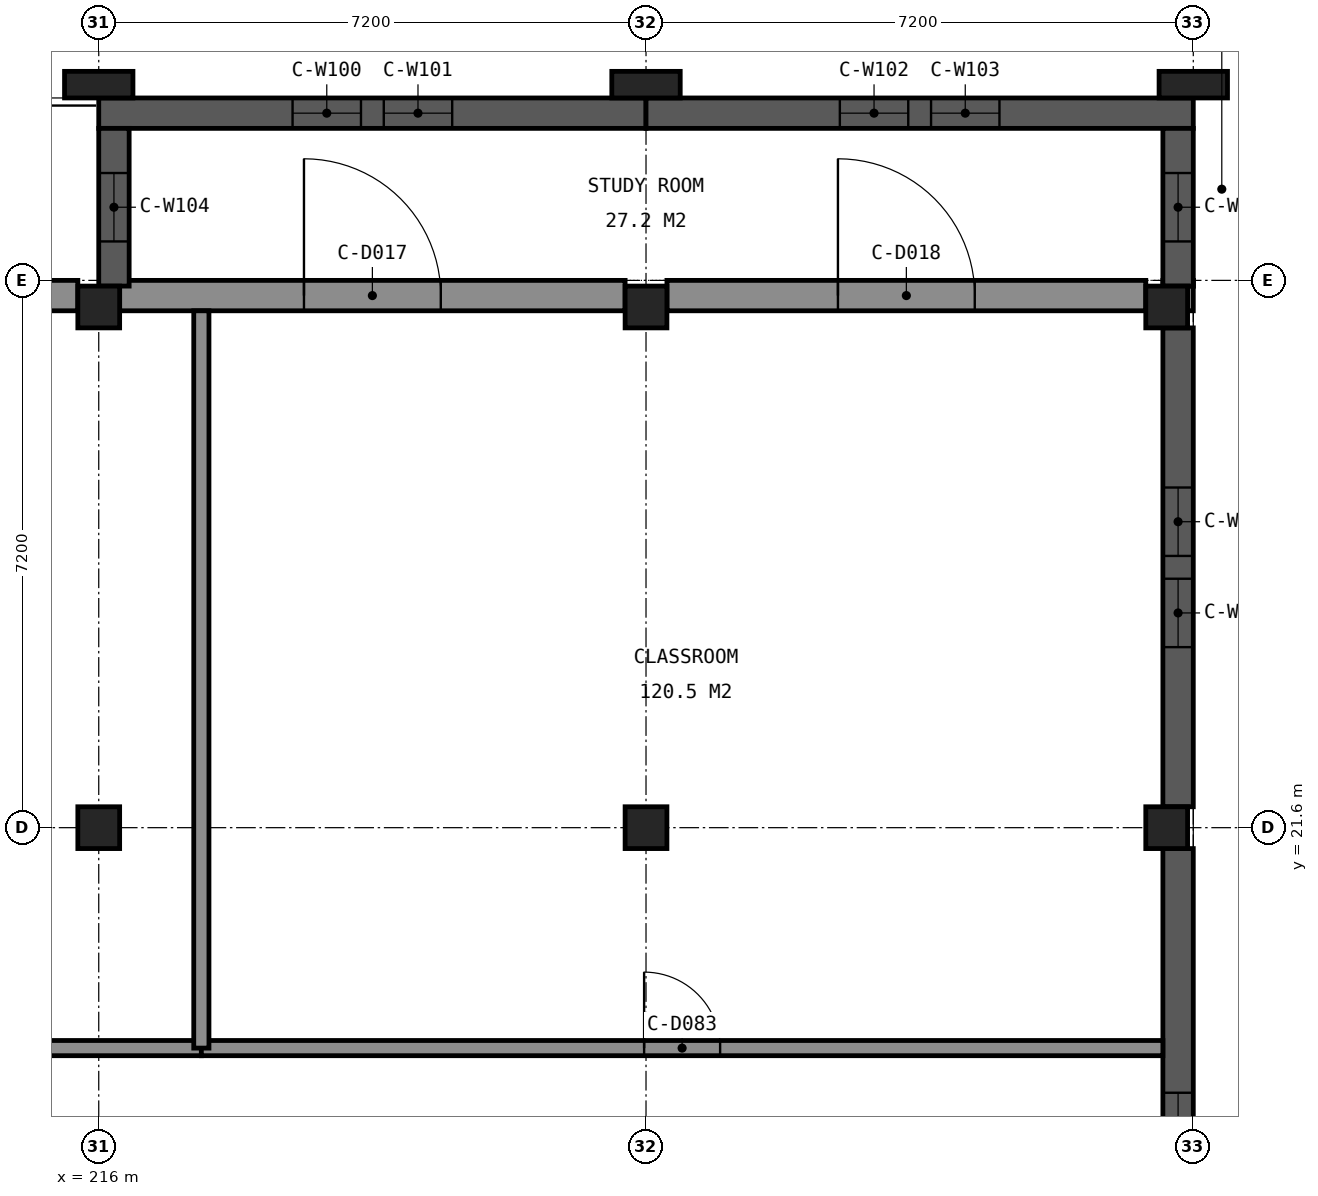
"""IFC4 building model, lengths in metres.
Left out: names, types, materials, properties, quantities, classifications, styles, units other than length and angle.
Written with IfcOpenShell. Run it as: python <this file> out.ifc"""

import sys

from ifc_helpers import new_model, si_unit, direction, frame, frame_2d, origin, origin_2d, place, context, subcontext, project, spatial, rectangle, extrude, element, fill, save


model = new_model("IFC4")
c1 = context("Model", 3, precision=1e-05, world=origin(), true_north=direction((0.0, 1.0)))
c2 = subcontext(c1, "Body", "Model", "MODEL_VIEW")
j1 = project(units=[si_unit("LENGTHUNIT", "METRE"), si_unit("PLANEANGLEUNIT", "RADIAN")], contexts=[c1])
p1 = place(None, origin())
s1 = spatial("IfcSite", under=j1, at=p1, CompositionType="ELEMENT")
p2 = place(p1, origin())
s2 = spatial("IfcBuilding", under=s1, at=p2, CompositionType="ELEMENT")
p3 = place(p2, frame((0.0, 0.0, 14.4)))
s3 = spatial("IfcBuildingStorey", under=s2, at=p3, CompositionType="ELEMENT", Elevation=14.4)
for number, where, z_axis, x_axis in (
    (1, (216.0, 28.45, 0.0), (0.0, 0.0, 1.0), (1.0, 0.0, 0.0)),
    (2, (223.2, 28.45, 0.0), (0.0, 0.0, 1.0), (1.0, 0.0, 0.0)),
    (3, (230.05, 28.45, 0.0), (0.0, 0.0, 1.0), (1.0, 0.0, 0.0)),
    (4, (216.0, 21.6, 0.0), (0.0, 0.0, 1.0), (1.0, 0.0, 0.0)),
    (5, (223.2, 21.6, 0.0), (0.0, 0.0, 1.0), (1.0, 0.0, 0.0)),
    (6, (230.05, 21.6, 0.0), (0.0, 0.0, 1.0), (1.0, 0.0, 0.0)),
):
    element("IfcColumn", number, at=place(p3, frame(where, z_axis=z_axis, x_axis=x_axis)), inside=s3, PredefinedType="COLUMN", context=c2, shape_type="SweptSolid", body=[
        extrude(rectangle(XDim=0.55, YDim=0.55, at=origin_2d()), origin(), (0.0, 0.0, 1.0), 4.8),
    ])
p4 = place(p3, frame((209.075, 28.6, 0.0), z_axis=(0.0, 0.0, 1.0), x_axis=(1.0, 0.0, 0.0)))
e7 = element("IfcWall", 7, at=p4, inside=s3, PredefinedType="SOLIDWALL", context=c2, shape_type="SweptSolid", body=[
    extrude(rectangle(XDim=6.65, YDim=0.4, at=frame_2d((3.325, 0.0))), origin(), (0.0, 0.0, 1.0), 3.7),
])
p5 = place(p4, frame((2.425, 0.0, 0.0)))
e8 = element("IfcOpeningElement", 8, at=p5, cuts=e7, PredefinedType="OPENING", context=c2, shape_type="SweptSolid", body=[
    extrude(rectangle(XDim=1.8, YDim=2.1, at=frame_2d((0.9, 1.05))), frame((0.0, 0.21, 0.0), z_axis=(0.0, -1.0, 0.0), x_axis=(1.0, 0.0, 0.0)), (0.0, 0.0, 1.0), 0.42),
])
p6 = place(p3, frame((216.275, 28.6, 0.0), z_axis=(0.0, 0.0, 1.0), x_axis=(1.0, 0.0, 0.0)))
e9 = element("IfcWall", 9, at=p6, inside=s3, PredefinedType="SOLIDWALL", context=c2, shape_type="SweptSolid", body=[
    extrude(rectangle(XDim=6.65, YDim=0.4, at=frame_2d((3.325, 0.0))), origin(), (0.0, 0.0, 1.0), 3.7),
])
p7 = place(p6, frame((2.425, 0.0, 0.0)))
e10 = element("IfcOpeningElement", 10, at=p7, cuts=e9, PredefinedType="OPENING", context=c2, shape_type="SweptSolid", body=[
    extrude(rectangle(XDim=1.8, YDim=2.1, at=frame_2d((0.9, 1.05))), frame((0.0, 0.21, 0.0), z_axis=(0.0, -1.0, 0.0), x_axis=(1.0, 0.0, 0.0)), (0.0, 0.0, 1.0), 0.42),
])
p8 = place(p3, frame((223.475, 28.6, 0.0), z_axis=(0.0, 0.0, 1.0), x_axis=(1.0, 0.0, 0.0)))
e11 = element("IfcWall", 11, at=p8, inside=s3, PredefinedType="SOLIDWALL", context=c2, shape_type="SweptSolid", body=[
    extrude(rectangle(XDim=6.3, YDim=0.4, at=frame_2d((3.15, 0.0))), origin(), (0.0, 0.0, 1.0), 3.7),
])
p9 = place(p8, frame((2.25, 0.0, 0.0)))
e12 = element("IfcOpeningElement", 12, at=p9, cuts=e11, PredefinedType="OPENING", context=c2, shape_type="SweptSolid", body=[
    extrude(rectangle(XDim=1.8, YDim=2.1, at=frame_2d((0.9, 1.05))), frame((0.0, 0.21, 0.0), z_axis=(0.0, -1.0, 0.0), x_axis=(1.0, 0.0, 0.0)), (0.0, 0.0, 1.0), 0.42),
])
p10 = place(p3, frame((230.325, 28.6, 0.0), z_axis=(0.0, 0.0, 1.0), x_axis=(1.0, 0.0, 0.0)))
e13 = element("IfcWall", 13, at=p10, inside=s3, PredefinedType="SOLIDWALL", context=c2, shape_type="SweptSolid", body=[
    extrude(rectangle(XDim=0.075, YDim=0.4, at=frame_2d((0.038, 0.0))), origin(), (0.0, 0.0, 1.0), 3.7),
])
p11 = place(p3, frame((230.2, 28.8, 0.0), z_axis=(0.0, 0.0, 1.0), x_axis=(0.0, -1.0, 0.0)))
e14 = element("IfcWall", 14, at=p11, inside=s3, PredefinedType="SHEAR", context=c2, shape_type="SweptSolid", body=[
    extrude(rectangle(XDim=0.075, YDim=0.4, at=frame_2d((0.038, 0.0))), origin(), (0.0, 0.0, 1.0), 3.7),
])
p12 = place(p3, frame((230.2, 28.175, 0.0), z_axis=(0.0, 0.0, 1.0), x_axis=(0.0, -1.0, 0.0)))
e15 = element("IfcWall", 15, at=p12, inside=s3, PredefinedType="SHEAR", context=c2, shape_type="SweptSolid", body=[
    extrude(rectangle(XDim=6.3, YDim=0.4, at=frame_2d((3.15, 0.0))), origin(), (0.0, 0.0, 1.0), 3.7),
])
p13 = place(p12, frame((2.1, 0.0, 1.8)))
e16 = element("IfcOpeningElement", 16, at=p13, cuts=e15, PredefinedType="OPENING", context=c2, shape_type="SweptSolid", body=[
    extrude(rectangle(XDim=0.9, YDim=1.2, at=frame_2d((0.45, 0.6))), frame((0.0, 0.21, 0.0), z_axis=(0.0, -1.0, 0.0), x_axis=(1.0, 0.0, 0.0)), (0.0, 0.0, 1.0), 0.42),
])
p14 = place(p12, frame((3.3, 0.0, 1.8)))
e17 = element("IfcOpeningElement", 17, at=p14, cuts=e15, PredefinedType="OPENING", context=c2, shape_type="SweptSolid", body=[
    extrude(rectangle(XDim=0.9, YDim=1.2, at=frame_2d((0.45, 0.6))), frame((0.0, 0.21, 0.0), z_axis=(0.0, -1.0, 0.0), x_axis=(1.0, 0.0, 0.0)), (0.0, 0.0, 1.0), 0.42),
])
p15 = place(p3, frame((230.2, 21.325, 0.0), z_axis=(0.0, 0.0, 1.0), x_axis=(0.0, -1.0, 0.0)))
e18 = element("IfcWall", 18, at=p15, inside=s3, PredefinedType="SHEAR", context=c2, shape_type="SweptSolid", body=[
    extrude(rectangle(XDim=6.125, YDim=0.4, at=frame_2d((3.062, 0.0))), origin(), (0.0, 0.0, 1.0), 3.7),
])
p16 = place(p15, frame((3.212, 0.0, 1.8)))
e19 = element("IfcOpeningElement", 19, at=p16, cuts=e18, PredefinedType="OPENING", context=c2, shape_type="SweptSolid", body=[
    extrude(rectangle(XDim=0.9, YDim=1.2, at=frame_2d((0.45, 0.6))), frame((0.0, 0.21, 0.0), z_axis=(0.0, -1.0, 0.0), x_axis=(1.0, 0.0, 0.0)), (0.0, 0.0, 1.0), 0.42),
])
p17 = place(p3, frame((158.4, 28.6, 4.8), z_axis=(0.0, 0.0, 1.0), x_axis=(1.0, 0.0, 0.0)))
e20 = element("IfcWall", 20, at=p17, inside=s3, PredefinedType="SOLIDWALL", context=c2, shape_type="SweptSolid", body=[
    extrude(rectangle(XDim=72.0, YDim=0.4, at=frame_2d((36.0, 0.0))), origin(), (0.0, 0.0, 1.0), 0.45),
])
p18 = place(p3, frame((230.2, 28.4, 4.8), z_axis=(0.0, 0.0, 1.0), x_axis=(0.0, -1.0, 0.0)))
e21 = element("IfcWall", 21, at=p18, inside=s3, PredefinedType="SOLIDWALL", context=c2, shape_type="SweptSolid", body=[
    extrude(rectangle(XDim=10.6, YDim=0.4, at=frame_2d((5.3, 0.0))), origin(), (0.0, 0.0, 1.0), 0.45),
])
for number, where, z_axis, x_axis in (
    (22, (216.0, 21.6, 4.8), (0.0, 0.0, 1.0), (1.0, 0.0, 0.0)),
    (23, (223.2, 21.6, 4.8), (0.0, 0.0, 1.0), (1.0, 0.0, 0.0)),
):
    element("IfcColumn", number, at=place(p3, frame(where, z_axis=z_axis, x_axis=x_axis)), inside=s3, PredefinedType="COLUMN", context=c2, shape_type="SweptSolid", body=[
        extrude(rectangle(XDim=0.3, YDim=0.3, at=origin_2d()), origin(), (0.0, 0.0, 1.0), 1.4),
    ])
p19 = place(p3, frame((216.0, 31.0, 0.0), z_axis=(0.0, 0.0, 1.0), x_axis=(1.0, 0.0, 0.0)))
e24 = element("IfcWall", 24, at=p19, inside=s3, PredefinedType="SOLIDWALL", context=c2, shape_type="SweptSolid", body=[
    extrude(rectangle(XDim=7.2, YDim=0.4, at=frame_2d((3.6, 0.0))), origin(), (0.0, 0.0, 1.0), 4.893),
])
p20 = place(p19, frame((2.55, 0.0, 1.8)))
e25 = element("IfcOpeningElement", 25, at=p20, cuts=e24, PredefinedType="OPENING", context=c2, shape_type="SweptSolid", body=[
    extrude(rectangle(XDim=0.9, YDim=1.2, at=frame_2d((0.45, 0.6))), frame((0.0, 0.21, 0.0), z_axis=(0.0, -1.0, 0.0), x_axis=(1.0, 0.0, 0.0)), (0.0, 0.0, 1.0), 0.42),
])
p21 = place(p19, frame((3.75, 0.0, 1.8)))
e26 = element("IfcOpeningElement", 26, at=p21, cuts=e24, PredefinedType="OPENING", context=c2, shape_type="SweptSolid", body=[
    extrude(rectangle(XDim=0.9, YDim=1.2, at=frame_2d((0.45, 0.6))), frame((0.0, 0.21, 0.0), z_axis=(0.0, -1.0, 0.0), x_axis=(1.0, 0.0, 0.0)), (0.0, 0.0, 1.0), 0.42),
])
p22 = place(p3, frame((223.2, 31.0, 0.0), z_axis=(0.0, 0.0, 1.0), x_axis=(1.0, 0.0, 0.0)))
e27 = element("IfcWall", 27, at=p22, inside=s3, PredefinedType="SOLIDWALL", context=c2, shape_type="SweptSolid", body=[
    extrude(rectangle(XDim=7.2, YDim=0.4, at=frame_2d((3.6, 0.0))), origin(), (0.0, 0.0, 1.0), 4.893),
])
p23 = place(p22, frame((2.55, 0.0, 1.8)))
e28 = element("IfcOpeningElement", 28, at=p23, cuts=e27, PredefinedType="OPENING", context=c2, shape_type="SweptSolid", body=[
    extrude(rectangle(XDim=0.9, YDim=1.2, at=frame_2d((0.45, 0.6))), frame((0.0, 0.21, 0.0), z_axis=(0.0, -1.0, 0.0), x_axis=(1.0, 0.0, 0.0)), (0.0, 0.0, 1.0), 0.42),
])
p24 = place(p22, frame((3.75, 0.0, 1.8)))
e29 = element("IfcOpeningElement", 29, at=p24, cuts=e27, PredefinedType="OPENING", context=c2, shape_type="SweptSolid", body=[
    extrude(rectangle(XDim=0.9, YDim=1.2, at=frame_2d((0.45, 0.6))), frame((0.0, 0.21, 0.0), z_axis=(0.0, -1.0, 0.0), x_axis=(1.0, 0.0, 0.0)), (0.0, 0.0, 1.0), 0.42),
])
p25 = place(p3, frame((216.2, 28.725, 0.0), z_axis=(0.0, 0.0, 1.0), x_axis=(0.0, 1.0, 0.0)))
e30 = element("IfcWall", 30, at=p25, inside=s3, PredefinedType="SOLIDWALL", context=c2, shape_type="SweptSolid", body=[
    extrude(rectangle(XDim=2.075, YDim=0.4, at=frame_2d((1.038, 0.0))), origin(), (0.0, 0.0, 1.0), 4.893),
])
p26 = place(p25, frame((0.587, 0.0, 1.8)))
e31 = element("IfcOpeningElement", 31, at=p26, cuts=e30, PredefinedType="OPENING", context=c2, shape_type="SweptSolid", body=[
    extrude(rectangle(XDim=0.9, YDim=1.2, at=frame_2d((0.45, 0.6))), frame((0.0, 0.21, 0.0), z_axis=(0.0, -1.0, 0.0), x_axis=(1.0, 0.0, 0.0)), (0.0, 0.0, 1.0), 0.42),
])
p27 = place(p3, frame((230.2, 30.8, 0.0), z_axis=(0.0, 0.0, 1.0), x_axis=(0.0, -1.0, 0.0)))
e32 = element("IfcWall", 32, at=p27, inside=s3, PredefinedType="SOLIDWALL", context=c2, shape_type="SweptSolid", body=[
    extrude(rectangle(XDim=2.075, YDim=0.4, at=frame_2d((1.038, 0.0))), origin(), (0.0, 0.0, 1.0), 4.893),
])
p28 = place(p27, frame((0.587, 0.0, 1.8)))
e33 = element("IfcOpeningElement", 33, at=p28, cuts=e32, PredefinedType="OPENING", context=c2, shape_type="SweptSolid", body=[
    extrude(rectangle(XDim=0.9, YDim=1.2, at=frame_2d((0.45, 0.6))), frame((0.0, 0.21, 0.0), z_axis=(0.0, -1.0, 0.0), x_axis=(1.0, 0.0, 0.0)), (0.0, 0.0, 1.0), 0.42),
])
for number, where, z_axis, x_axis in (
    (34, (216.0, 31.375, 0.0), (0.0, 0.0, 1.0), (1.0, 0.0, 0.0)),
    (35, (223.2, 31.375, 0.0), (0.0, 0.0, 1.0), (1.0, 0.0, 0.0)),
    (36, (230.4, 31.375, 0.0), (0.0, 0.0, 1.0), (1.0, 0.0, 0.0)),
):
    element("IfcColumn", number, at=place(p3, frame(where, z_axis=z_axis, x_axis=x_axis)), inside=s3, PredefinedType="PILASTER", context=c2, shape_type="SweptSolid", body=[
        extrude(rectangle(XDim=0.9, YDim=0.35, at=origin_2d()), origin(), (0.0, 0.0, 1.0), 3.9),
    ])
p29 = place(p3, frame((208.8, 30.75, 4.3), z_axis=(0.0, 0.0, 1.0), x_axis=(1.0, 0.0, 0.0)))
e37 = element("IfcWall", 37, at=p29, inside=s3, PredefinedType="SOLIDWALL", context=c2, shape_type="SweptSolid", body=[
    extrude(rectangle(XDim=7.2, YDim=0.9, at=frame_2d((3.6, 0.0))), origin(), (0.0, 0.0, 1.0), 0.2),
])
p30 = place(p3, frame((204.7, 18.7, 0.0), z_axis=(0.0, 0.0, 1.0), x_axis=(1.0, 0.0, 0.0)))
e38 = element("IfcWall", 38, at=p30, inside=s3, PredefinedType="PARTITIONING", context=c2, shape_type="SweptSolid", body=[
    extrude(rectangle(XDim=12.65, YDim=0.2, at=frame_2d((6.325, 0.0))), origin(), (0.0, 0.0, 1.0), 3.7),
])
p31 = place(p30, frame((5.825, 0.0, 0.0)))
e39 = element("IfcOpeningElement", 39, at=p31, cuts=e38, PredefinedType="OPENING", context=c2, shape_type="SweptSolid", body=[
    extrude(rectangle(XDim=1.0, YDim=2.1, at=frame_2d((0.5, 1.05))), frame((0.0, 0.11, 0.0), z_axis=(0.0, -1.0, 0.0), x_axis=(1.0, 0.0, 0.0)), (0.0, 0.0, 1.0), 0.22),
])
p32 = place(p3, frame((217.35, 18.7, 0.0), z_axis=(0.0, 0.0, 1.0), x_axis=(1.0, 0.0, 0.0)))
e40 = element("IfcWall", 40, at=p32, inside=s3, PredefinedType="PARTITIONING", context=c2, shape_type="SweptSolid", body=[
    extrude(rectangle(XDim=12.65, YDim=0.2, at=frame_2d((6.325, 0.0))), origin(), (0.0, 0.0, 1.0), 3.7),
])
p33 = place(p32, frame((5.825, 0.0, 0.0)))
e41 = element("IfcOpeningElement", 41, at=p33, cuts=e40, PredefinedType="OPENING", context=c2, shape_type="SweptSolid", body=[
    extrude(rectangle(XDim=1.0, YDim=2.1, at=frame_2d((0.5, 1.05))), frame((0.0, 0.11, 0.0), z_axis=(0.0, -1.0, 0.0), x_axis=(1.0, 0.0, 0.0)), (0.0, 0.0, 1.0), 0.22),
])
p34 = place(p3, frame((217.35, 28.4, 0.0), z_axis=(0.0, 0.0, 1.0), x_axis=(0.0, -1.0, 0.0)))
e42 = element("IfcWall", 42, at=p34, inside=s3, PredefinedType="PARTITIONING", context=c2, shape_type="SweptSolid", body=[
    extrude(rectangle(XDim=9.7, YDim=0.2, at=frame_2d((4.85, 0.0))), origin(), (0.0, 0.0, 1.0), 3.7),
])
p35 = place(p7, origin())
e43 = element("IfcDoor", 43, at=p35, inside=s3, OperationType="NOTDEFINED", PredefinedType="DOOR", context=c2, shape_type="SweptSolid", body=[
    extrude(rectangle(XDim=1.8, YDim=2.1, at=frame_2d((0.9, 1.05))), frame((0.0, 0.025, 0.0), z_axis=(0.0, -1.0, 0.0), x_axis=(1.0, 0.0, 0.0)), (0.0, 0.0, 1.0), 0.05),
])
fill(e10, e43)
p36 = place(p9, origin())
e44 = element("IfcDoor", 44, at=p36, inside=s3, OperationType="NOTDEFINED", PredefinedType="DOOR", context=c2, shape_type="SweptSolid", body=[
    extrude(rectangle(XDim=1.8, YDim=2.1, at=frame_2d((0.9, 1.05))), frame((0.0, 0.025, 0.0), z_axis=(0.0, -1.0, 0.0), x_axis=(1.0, 0.0, 0.0)), (0.0, 0.0, 1.0), 0.05),
])
fill(e12, e44)
p37 = place(p13, origin())
e45 = element("IfcWindow", 45, at=p37, inside=s3, PartitioningType="SINGLE_PANEL", PredefinedType="WINDOW", context=c2, shape_type="SweptSolid", body=[
    extrude(rectangle(XDim=0.9, YDim=1.2, at=frame_2d((0.45, 0.6))), frame((0.0, -0.09, 0.0), z_axis=(0.0, -1.0, 0.0), x_axis=(1.0, 0.0, 0.0)), (0.0, 0.0, 1.0), 0.06),
])
fill(e16, e45)
p38 = place(p14, origin())
e46 = element("IfcWindow", 46, at=p38, inside=s3, PartitioningType="SINGLE_PANEL", PredefinedType="WINDOW", context=c2, shape_type="SweptSolid", body=[
    extrude(rectangle(XDim=0.9, YDim=1.2, at=frame_2d((0.45, 0.6))), frame((0.0, -0.09, 0.0), z_axis=(0.0, -1.0, 0.0), x_axis=(1.0, 0.0, 0.0)), (0.0, 0.0, 1.0), 0.06),
])
fill(e17, e46)
p39 = place(p16, origin())
e47 = element("IfcWindow", 47, at=p39, inside=s3, PartitioningType="SINGLE_PANEL", PredefinedType="WINDOW", context=c2, shape_type="SweptSolid", body=[
    extrude(rectangle(XDim=0.9, YDim=1.2, at=frame_2d((0.45, 0.6))), frame((0.0, -0.09, 0.0), z_axis=(0.0, -1.0, 0.0), x_axis=(1.0, 0.0, 0.0)), (0.0, 0.0, 1.0), 0.06),
])
fill(e19, e47)
p40 = place(p20, origin())
e48 = element("IfcWindow", 48, at=p40, inside=s3, PartitioningType="SINGLE_PANEL", PredefinedType="WINDOW", context=c2, shape_type="SweptSolid", body=[
    extrude(rectangle(XDim=0.9, YDim=1.2, at=frame_2d((0.45, 0.6))), frame((0.0, -0.09, 0.0), z_axis=(0.0, -1.0, 0.0), x_axis=(1.0, 0.0, 0.0)), (0.0, 0.0, 1.0), 0.06),
])
fill(e25, e48)
p41 = place(p21, origin())
e49 = element("IfcWindow", 49, at=p41, inside=s3, PartitioningType="SINGLE_PANEL", PredefinedType="WINDOW", context=c2, shape_type="SweptSolid", body=[
    extrude(rectangle(XDim=0.9, YDim=1.2, at=frame_2d((0.45, 0.6))), frame((0.0, -0.09, 0.0), z_axis=(0.0, -1.0, 0.0), x_axis=(1.0, 0.0, 0.0)), (0.0, 0.0, 1.0), 0.06),
])
fill(e26, e49)
p42 = place(p23, origin())
e50 = element("IfcWindow", 50, at=p42, inside=s3, PartitioningType="SINGLE_PANEL", PredefinedType="WINDOW", context=c2, shape_type="SweptSolid", body=[
    extrude(rectangle(XDim=0.9, YDim=1.2, at=frame_2d((0.45, 0.6))), frame((0.0, -0.09, 0.0), z_axis=(0.0, -1.0, 0.0), x_axis=(1.0, 0.0, 0.0)), (0.0, 0.0, 1.0), 0.06),
])
fill(e28, e50)
p43 = place(p24, origin())
e51 = element("IfcWindow", 51, at=p43, inside=s3, PartitioningType="SINGLE_PANEL", PredefinedType="WINDOW", context=c2, shape_type="SweptSolid", body=[
    extrude(rectangle(XDim=0.9, YDim=1.2, at=frame_2d((0.45, 0.6))), frame((0.0, -0.09, 0.0), z_axis=(0.0, -1.0, 0.0), x_axis=(1.0, 0.0, 0.0)), (0.0, 0.0, 1.0), 0.06),
])
fill(e29, e51)
p44 = place(p26, origin())
e52 = element("IfcWindow", 52, at=p44, inside=s3, PartitioningType="SINGLE_PANEL", PredefinedType="WINDOW", context=c2, shape_type="SweptSolid", body=[
    extrude(rectangle(XDim=0.9, YDim=1.2, at=frame_2d((0.45, 0.6))), frame((0.0, -0.09, 0.0), z_axis=(0.0, -1.0, 0.0), x_axis=(1.0, 0.0, 0.0)), (0.0, 0.0, 1.0), 0.06),
])
fill(e31, e52)
p45 = place(p28, origin())
e53 = element("IfcWindow", 53, at=p45, inside=s3, PartitioningType="SINGLE_PANEL", PredefinedType="WINDOW", context=c2, shape_type="SweptSolid", body=[
    extrude(rectangle(XDim=0.9, YDim=1.2, at=frame_2d((0.45, 0.6))), frame((0.0, -0.09, 0.0), z_axis=(0.0, -1.0, 0.0), x_axis=(1.0, 0.0, 0.0)), (0.0, 0.0, 1.0), 0.06),
])
fill(e33, e53)
p46 = place(p33, origin())
e54 = element("IfcDoor", 54, at=p46, inside=s3, OperationType="NOTDEFINED", PredefinedType="DOOR", context=c2, shape_type="SweptSolid", body=[
    extrude(rectangle(XDim=1.0, YDim=2.1, at=frame_2d((0.5, 1.05))), frame((0.0, 0.025, 0.0), z_axis=(0.0, -1.0, 0.0), x_axis=(1.0, 0.0, 0.0)), (0.0, 0.0, 1.0), 0.05),
])
fill(e41, e54)
save(model, sys.argv[1])
